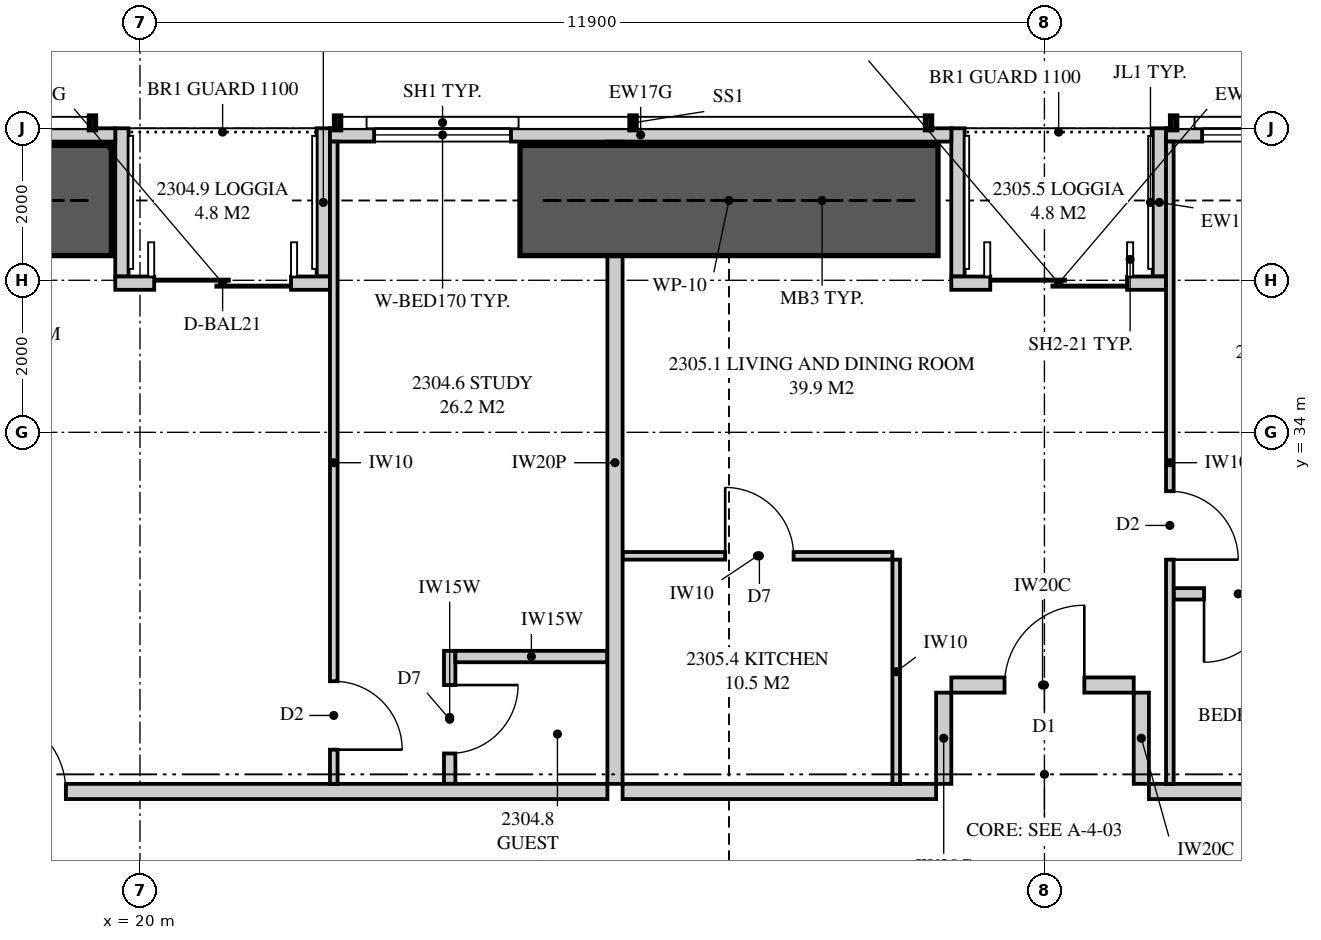
"""IFC4 building model, lengths in metres.
Left out: names, types, materials, properties, quantities, classifications, styles, units other than length and angle.
Written with IfcOpenShell. Run it as: python <this file> out.ifc"""

import sys

from ifc_helpers import new_model, si_unit, direction, frame, frame_2d, origin, place, context, subcontext, project, spatial, polyline, rectangle, outline, extrude, element, fill, save


model = new_model("IFC4")
c1 = context("Model", 3, precision=1e-05, world=origin(), true_north=direction((0.0, 1.0)))
c2 = subcontext(c1, "Body", "Model", "MODEL_VIEW")
j1 = project(units=[si_unit("LENGTHUNIT", "METRE"), si_unit("PLANEANGLEUNIT", "RADIAN")], contexts=[c1])
p1 = place(None, origin())
s1 = spatial("IfcSite", under=j1, at=p1, CompositionType="ELEMENT")
p2 = place(p1, origin())
s2 = spatial("IfcBuilding", under=s1, at=p2, CompositionType="ELEMENT")
p3 = place(p2, frame((0.0, 0.0, 88.1)))
s3 = spatial("IfcBuildingStorey", under=s2, at=p3, CompositionType="ELEMENT", Elevation=88.1)
p4 = place(p3, frame((41.449, 37.913, 0.0), z_axis=(0.0, 0.0, 1.0), x_axis=(-1.0, 0.0, 0.0)))
e1 = element("IfcWall", 1, at=p4, inside=s3, PredefinedType="SOLIDWALL", context=c2, shape_type="SweptSolid", body=[
    extrude(outline(polyline([(0.0, 0.0), (7.949, 0.0), (7.949, 2.15), (2.824, 2.15), (2.824, 3.11), (2.666, 3.11), (2.666, 2.15), (2.62, 2.15), (2.62, 3.11), (0.0, 3.11), (0.0, 0.0)])), frame((0.0, 0.087, 0.0), z_axis=(0.0, -1.0, 0.0), x_axis=(1.0, 0.0, 0.0)), (0.0, 0.0, 1.0), 0.175),
])
p5 = place(p4, frame((5.674, 0.0, 0.4)))
e2 = element("IfcOpeningElement", 2, at=p5, cuts=e1, PredefinedType="OPENING", context=c2, shape_type="SweptSolid", body=[
    extrude(rectangle(XDim=1.8, YDim=1.7, at=frame_2d((0.9, 0.85))), frame((0.0, 0.097, 0.0), z_axis=(0.0, -1.0, 0.0), x_axis=(1.0, 0.0, 0.0)), (0.0, 0.0, 1.0), 0.195),
])
p6 = place(p3, frame((30.675, 37.913, 0.0), z_axis=(0.0, 0.0, 1.0), x_axis=(-1.0, 0.0, 0.0)))
e3 = element("IfcWall", 3, at=p6, inside=s3, PredefinedType="SOLIDWALL", context=c2, shape_type="SweptSolid", body=[
    extrude(rectangle(XDim=8.175, YDim=0.175, at=frame_2d((4.087, 0.0))), origin(), (0.0, 0.0, 1.0), 2.15),
])
p7 = place(p6, frame((5.794, 0.0, 0.4)))
e4 = element("IfcOpeningElement", 4, at=p7, cuts=e3, PredefinedType="OPENING", context=c2, shape_type="SweptSolid", body=[
    extrude(rectangle(XDim=1.8, YDim=1.7, at=frame_2d((0.9, 0.85))), frame((0.0, 0.097, 0.0), z_axis=(0.0, -1.0, 0.0), x_axis=(1.0, 0.0, 0.0)), (0.0, 0.0, 1.0), 0.195),
])
p8 = place(p3, frame((19.675, 37.913, 0.0), z_axis=(0.0, 0.0, 1.0), x_axis=(-1.0, 0.0, 0.0)))
e5 = element("IfcWall", 5, at=p8, inside=s3, PredefinedType="SOLIDWALL", context=c2, shape_type="SweptSolid", body=[
    extrude(outline(polyline([(0.0, 0.0), (10.624, 0.0), (10.624, 3.11), (3.003, 3.11), (3.003, 2.15), (2.958, 2.15), (2.958, 3.11), (2.8, 3.11), (2.8, 2.15), (0.0, 2.15), (0.0, 0.0)])), frame((0.0, 0.087, 0.0), z_axis=(0.0, -1.0, 0.0), x_axis=(1.0, 0.0, 0.0)), (0.0, 0.0, 1.0), 0.175),
])
p9 = place(p8, frame((6.475, 0.0, 0.4)))
e6 = element("IfcOpeningElement", 6, at=p9, cuts=e5, PredefinedType="OPENING", context=c2, shape_type="SweptSolid", body=[
    extrude(rectangle(XDim=1.8, YDim=1.7, at=frame_2d((0.9, 0.85))), frame((0.0, 0.097, 0.0), z_axis=(0.0, -1.0, 0.0), x_axis=(1.0, 0.0, 0.0)), (0.0, 0.0, 1.0), 0.195),
])
p10 = place(p3, frame((33.5, 35.962, 0.0), z_axis=(0.0, 0.0, 1.0), x_axis=(-1.0, 0.0, 0.0)))
e7 = element("IfcWall", 7, at=p10, inside=s3, PredefinedType="SOLIDWALL", context=c2, shape_type="SweptSolid", body=[
    extrude(rectangle(XDim=2.825, YDim=0.175, at=frame_2d((1.413, 0.0))), origin(), (0.0, 0.0, 1.0), 3.11),
])
p11 = place(p10, frame((0.512, 0.0, 0.0)))
e8 = element("IfcOpeningElement", 8, at=p11, cuts=e7, PredefinedType="OPENING", context=c2, shape_type="SweptSolid", body=[
    extrude(rectangle(XDim=1.8, YDim=2.1, at=frame_2d((0.9, 1.05))), frame((0.0, 0.097, 0.0), z_axis=(0.0, -1.0, 0.0), x_axis=(1.0, 0.0, 0.0)), (0.0, 0.0, 1.0), 0.195),
])
for number, where, z_axis, x_axis in (
    (9, (33.413, 38.0, 0.0), (0.0, 0.0, 1.0), (0.0, -1.0, 0.0)),
    (10, (30.762, 38.0, 0.0), (0.0, 0.0, 1.0), (0.0, -1.0, 0.0)),
):
    element("IfcWall", number, at=place(p3, frame(where, z_axis=z_axis, x_axis=x_axis)), inside=s3, PredefinedType="SOLIDWALL", context=c2, shape_type="SweptSolid", body=[
        extrude(outline(polyline([(0.0, 0.0), (1.95, 0.0), (1.95, 3.11), (1.75, 3.11), (1.75, 2.15), (0.15, 2.15), (0.15, 3.11), (0.0, 3.11), (0.0, 0.0)])), frame((0.0, 0.087, 0.0), z_axis=(0.0, -1.0, 0.0), x_axis=(1.0, 0.0, 0.0)), (0.0, 0.0, 1.0), 0.175),
    ])
p12 = place(p3, frame((22.5, 35.962, 0.0), z_axis=(0.0, 0.0, 1.0), x_axis=(-1.0, 0.0, 0.0)))
e11 = element("IfcWall", 11, at=p12, inside=s3, PredefinedType="SOLIDWALL", context=c2, shape_type="SweptSolid", body=[
    extrude(rectangle(XDim=2.825, YDim=0.175, at=frame_2d((1.413, 0.0))), origin(), (0.0, 0.0, 1.0), 3.11),
])
p13 = place(p12, frame((0.512, 0.0, 0.0)))
e12 = element("IfcOpeningElement", 12, at=p13, cuts=e11, PredefinedType="OPENING", context=c2, shape_type="SweptSolid", body=[
    extrude(rectangle(XDim=1.8, YDim=2.1, at=frame_2d((0.9, 1.05))), frame((0.0, 0.097, 0.0), z_axis=(0.0, -1.0, 0.0), x_axis=(1.0, 0.0, 0.0)), (0.0, 0.0, 1.0), 0.195),
])
for number, where, z_axis, x_axis in (
    (13, (22.413, 38.0, 0.0), (0.0, 0.0, 1.0), (0.0, -1.0, 0.0)),
    (14, (19.762, 38.0, 0.0), (0.0, 0.0, 1.0), (0.0, -1.0, 0.0)),
):
    element("IfcWall", number, at=place(p3, frame(where, z_axis=z_axis, x_axis=x_axis)), inside=s3, PredefinedType="SOLIDWALL", context=c2, shape_type="SweptSolid", body=[
        extrude(outline(polyline([(0.0, 0.0), (1.95, 0.0), (1.95, 3.11), (1.75, 3.11), (1.75, 2.15), (0.15, 2.15), (0.15, 3.11), (0.0, 3.11), (0.0, 0.0)])), frame((0.0, 0.087, 0.0), z_axis=(0.0, -1.0, 0.0), x_axis=(1.0, 0.0, 0.0)), (0.0, 0.0, 1.0), 0.175),
    ])
p14 = place(p3, frame((26.25, 37.825, 0.0), z_axis=(0.0, 0.0, 1.0), x_axis=(0.0, -1.0, 0.0)))
e15 = element("IfcWall", 15, at=p14, inside=s3, PredefinedType="PARTITIONING", context=c2, shape_type="SweptSolid", body=[
    extrude(outline(polyline([(0.526, 2.15), (0.0, 2.15), (0.0, 0.0), (0.526, 0.0), (0.526, 0.491), (1.024, 0.491), (1.024, 0.0), (8.45, 0.0), (8.45, 3.11), (1.685, 3.11), (1.685, 2.15), (1.024, 2.15), (1.024, 1.659), (0.526, 1.659), (0.526, 2.15)])), frame((0.0, 0.1, 0.0), z_axis=(0.0, -1.0, 0.0), x_axis=(1.0, 0.0, 0.0)), (0.0, 0.0, 1.0), 0.2),
])
p15 = place(p3, frame((17.775, 29.275, 0.0), z_axis=(0.0, 0.0, 1.0), x_axis=(1.0, 0.0, 0.0)))
e16 = element("IfcWall", 16, at=p15, inside=s3, PredefinedType="PARTITIONING", context=c2, shape_type="SweptSolid", body=[
    extrude(rectangle(XDim=8.375, YDim=0.2, at=frame_2d((4.188, 0.0))), origin(), (0.0, 0.0, 1.0), 3.11),
])
p16 = place(p15, frame((0.2, 0.0, 0.0)))
e17 = element("IfcOpeningElement", 17, at=p16, cuts=e16, PredefinedType="OPENING", context=c2, shape_type="SweptSolid", body=[
    extrude(rectangle(XDim=1.05, YDim=2.2, at=frame_2d((0.525, 1.1))), frame((0.0, 0.11, 0.0), z_axis=(0.0, -1.0, 0.0), x_axis=(1.0, 0.0, 0.0)), (0.0, 0.0, 1.0), 0.22),
])
p17 = place(p3, frame((22.55, 37.825, 0.0), z_axis=(0.0, 0.0, 1.0), x_axis=(0.0, -1.0, 0.0)))
e18 = element("IfcWall", 18, at=p17, inside=s3, PredefinedType="PARTITIONING", context=c2, shape_type="SweptSolid", body=[
    extrude(outline(polyline([(0.0, 0.0), (8.45, 0.0), (8.45, 3.11), (1.635, 3.11), (1.635, 2.15), (0.0, 2.15), (0.0, 3.11), (0.0, 0.0)])), frame((0.0, 0.05, 0.0), z_axis=(0.0, -1.0, 0.0), x_axis=(1.0, 0.0, 0.0)), (0.0, 0.0, 1.0), 0.1),
])
p18 = place(p17, frame((7.1, 0.0, 0.0)))
e19 = element("IfcOpeningElement", 19, at=p18, cuts=e18, PredefinedType="OPENING", context=c2, shape_type="SweptSolid", body=[
    extrude(rectangle(XDim=0.9, YDim=2.1, at=frame_2d((0.45, 1.05))), frame((0.0, 0.06, 0.0), z_axis=(0.0, -1.0, 0.0), x_axis=(1.0, 0.0, 0.0)), (0.0, 0.0, 1.0), 0.12),
])
p19 = place(p3, frame((26.35, 29.275, 0.0), z_axis=(0.0, 0.0, 1.0), x_axis=(1.0, 0.0, 0.0)))
e20 = element("IfcWall", 20, at=p19, inside=s3, PredefinedType="PARTITIONING", context=c2, shape_type="SweptSolid", body=[
    extrude(outline(polyline([(0.0, 0.0), (4.125, 0.0), (4.125, 3.11), (1.746, 3.11), (1.746, 2.531), (1.054, 2.531), (1.054, 3.11), (0.0, 3.11), (0.0, 0.0)])), frame((0.0, 0.1, 0.0), z_axis=(0.0, -1.0, 0.0), x_axis=(1.0, 0.0, 0.0)), (0.0, 0.0, 1.0), 0.2),
])
p20 = place(p3, frame((33.55, 37.825, 0.0), z_axis=(0.0, 0.0, 1.0), x_axis=(0.0, -1.0, 0.0)))
e21 = element("IfcWall", 21, at=p20, inside=s3, PredefinedType="PARTITIONING", context=c2, shape_type="SweptSolid", body=[
    extrude(outline(polyline([(0.0, 0.0), (8.45, 0.0), (8.45, 3.11), (1.635, 3.11), (1.635, 2.15), (0.0, 2.15), (0.0, 3.11), (0.0, 0.0)])), frame((0.0, 0.05, 0.0), z_axis=(0.0, -1.0, 0.0), x_axis=(1.0, 0.0, 0.0)), (0.0, 0.0, 1.0), 0.1),
])
p21 = place(p20, frame((4.6, 0.0, 0.0)))
e22 = element("IfcOpeningElement", 22, at=p21, cuts=e21, PredefinedType="OPENING", context=c2, shape_type="SweptSolid", body=[
    extrude(rectangle(XDim=0.9, YDim=2.1, at=frame_2d((0.45, 1.05))), frame((0.0, 0.06, 0.0), z_axis=(0.0, -1.0, 0.0), x_axis=(1.0, 0.0, 0.0)), (0.0, 0.0, 1.0), 0.12),
])
p22 = place(p3, frame((33.6, 31.875, 0.0), z_axis=(0.0, 0.0, 1.0), x_axis=(1.0, 0.0, 0.0)))
e23 = element("IfcWall", 23, at=p22, inside=s3, PredefinedType="PLUMBINGWALL", context=c2, shape_type="SweptSolid", body=[
    extrude(rectangle(XDim=3.8, YDim=0.15, at=frame_2d((1.9, 0.0))), origin(), (0.0, 0.0, 1.0), 3.11),
])
p23 = place(p22, frame((0.4, 0.0, 0.0)))
e24 = element("IfcOpeningElement", 24, at=p23, cuts=e23, PredefinedType="OPENING", context=c2, shape_type="SweptSolid", body=[
    extrude(rectangle(XDim=0.9, YDim=2.1, at=frame_2d((0.45, 1.05))), frame((0.0, 0.085, 0.0), z_axis=(0.0, -1.0, 0.0), x_axis=(1.0, 0.0, 0.0)), (0.0, 0.0, 1.0), 0.17),
])
p24 = place(p3, frame((26.35, 32.375, 0.0), z_axis=(0.0, 0.0, 1.0), x_axis=(1.0, 0.0, 0.0)))
e25 = element("IfcWall", 25, at=p24, inside=s3, PredefinedType="PARTITIONING", context=c2, shape_type="SweptSolid", body=[
    extrude(outline(polyline([(0.0, 0.0), (3.55, 0.0), (3.55, 3.11), (1.696, 3.11), (1.696, 2.531), (1.104, 2.531), (1.104, 3.11), (0.0, 3.11), (0.0, 0.0)])), frame((0.0, 0.05, 0.0), z_axis=(0.0, -1.0, 0.0), x_axis=(1.0, 0.0, 0.0)), (0.0, 0.0, 1.0), 0.1),
])
p25 = place(p24, frame((1.35, 0.0, 0.0)))
e26 = element("IfcOpeningElement", 26, at=p25, cuts=e25, PredefinedType="OPENING", context=c2, shape_type="SweptSolid", body=[
    extrude(rectangle(XDim=0.9, YDim=2.1, at=frame_2d((0.45, 1.05))), frame((0.0, 0.06, 0.0), z_axis=(0.0, -1.0, 0.0), x_axis=(1.0, 0.0, 0.0)), (0.0, 0.0, 1.0), 0.12),
])
p26 = place(p3, frame((29.95, 32.325, 0.0), z_axis=(0.0, 0.0, 1.0), x_axis=(0.0, -1.0, 0.0)))
e27 = element("IfcWall", 27, at=p26, inside=s3, PredefinedType="PARTITIONING", context=c2, shape_type="SweptSolid", body=[
    extrude(rectangle(XDim=2.95, YDim=0.1, at=frame_2d((1.475, 0.0))), origin(), (0.0, 0.0, 1.0), 3.11),
])
p27 = place(p3, frame((33.275, 29.275, 0.0), z_axis=(0.0, 0.0, 1.0), x_axis=(1.0, 0.0, 0.0)))
e28 = element("IfcWall", 28, at=p27, inside=s3, PredefinedType="PARTITIONING", context=c2, shape_type="SweptSolid", body=[
    extrude(rectangle(XDim=4.125, YDim=0.2, at=frame_2d((2.062, 0.0))), origin(), (0.0, 0.0, 1.0), 3.11),
])
p28 = place(p3, frame((30.675, 30.675, 0.0), z_axis=(0.0, 0.0, 1.0), x_axis=(1.0, 0.0, 0.0)))
e29 = element("IfcWall", 29, at=p28, inside=s3, PredefinedType="PARTITIONING", context=c2, shape_type="SweptSolid", body=[
    extrude(rectangle(XDim=2.4, YDim=0.2, at=frame_2d((1.2, 0.0))), origin(), (0.0, 0.0, 1.0), 3.11),
])
p29 = place(p28, frame((0.7, 0.0, 0.0)))
e30 = element("IfcOpeningElement", 30, at=p29, cuts=e29, PredefinedType="OPENING", context=c2, shape_type="SweptSolid", body=[
    extrude(rectangle(XDim=1.05, YDim=2.2, at=frame_2d((0.525, 1.1))), frame((0.0, 0.11, 0.0), z_axis=(0.0, -1.0, 0.0), x_axis=(1.0, 0.0, 0.0)), (0.0, 0.0, 1.0), 0.22),
])
for number, where, z_axis, x_axis in (
    (31, (30.575, 29.375, 0.0), (0.0, 0.0, 1.0), (0.0, 1.0, 0.0)),
    (32, (33.175, 29.375, 0.0), (0.0, 0.0, 1.0), (0.0, 1.0, 0.0)),
):
    element("IfcWall", number, at=place(p3, frame(where, z_axis=z_axis, x_axis=x_axis)), inside=s3, PredefinedType="PARTITIONING", context=c2, shape_type="SweptSolid", body=[
        extrude(rectangle(XDim=1.2, YDim=0.2, at=frame_2d((0.6, 0.0))), origin(), (0.0, 0.0, 1.0), 3.11),
    ])
p30 = place(p3, frame((24.075, 29.375, 0.0), z_axis=(0.0, 0.0, 1.0), x_axis=(0.0, 1.0, 0.0)))
e33 = element("IfcWall", 33, at=p30, inside=s3, PredefinedType="PLUMBINGWALL", context=c2, shape_type="SweptSolid", body=[
    extrude(rectangle(XDim=1.75, YDim=0.15, at=frame_2d((0.875, 0.0))), origin(), (0.0, 0.0, 1.0), 3.11),
])
p31 = place(p30, frame((0.4, 0.0, 0.0)))
e34 = element("IfcOpeningElement", 34, at=p31, cuts=e33, PredefinedType="OPENING", context=c2, shape_type="SweptSolid", body=[
    extrude(rectangle(XDim=0.9, YDim=2.1, at=frame_2d((0.45, 1.05))), frame((0.0, 0.085, 0.0), z_axis=(0.0, -1.0, 0.0), x_axis=(1.0, 0.0, 0.0)), (0.0, 0.0, 1.0), 0.17),
])
p32 = place(p3, frame((26.15, 31.05, 0.0), z_axis=(0.0, 0.0, 1.0), x_axis=(-1.0, 0.0, 0.0)))
e35 = element("IfcWall", 35, at=p32, inside=s3, PredefinedType="PLUMBINGWALL", context=c2, shape_type="SweptSolid", body=[
    extrude(rectangle(XDim=2.0, YDim=0.15, at=frame_2d((1.0, 0.0))), origin(), (0.0, 0.0, 1.0), 3.11),
])
for number, where, z_axis, x_axis in (
    (36, (25.0, 37.05, 0.0), (0.0, 0.0, 1.0), (1.0, 0.0, 0.0)),
    (37, (14.125, 37.05, 0.0), (0.0, 0.0, 1.0), (1.0, 0.0, 0.0)),
):
    element("IfcWall", number, at=place(p3, frame(where, z_axis=z_axis, x_axis=x_axis)), inside=s3, PredefinedType="SHEAR", context=c2, shape_type="SweptSolid", body=[
        extrude(rectangle(XDim=5.5, YDim=1.45, at=frame_2d((2.75, 0.0))), origin(), (0.0, 0.0, 1.0), 3.35),
    ])
p33 = place(p5, origin())
e38 = element("IfcWindow", 38, at=p33, inside=s3, PartitioningType="SINGLE_PANEL", PredefinedType="WINDOW", context=c2, shape_type="SweptSolid", body=[
    extrude(rectangle(XDim=1.8, YDim=1.7, at=frame_2d((0.9, 0.85))), frame((0.0, 0.03, 0.0), z_axis=(0.0, -1.0, 0.0), x_axis=(1.0, 0.0, 0.0)), (0.0, 0.0, 1.0), 0.06),
])
fill(e2, e38)
p34 = place(p11, origin())
e39 = element("IfcDoor", 39, at=p34, inside=s3, OperationType="SLIDING_TO_LEFT", PredefinedType="DOOR", context=c2, shape_type="SweptSolid", body=[
    extrude(rectangle(XDim=1.8, YDim=2.1, at=frame_2d((0.9, 1.05))), frame((0.0, 0.025, 0.0), z_axis=(0.0, -1.0, 0.0), x_axis=(1.0, 0.0, 0.0)), (0.0, 0.0, 1.0), 0.05),
])
fill(e8, e39)
p35 = place(p7, origin())
e40 = element("IfcWindow", 40, at=p35, inside=s3, PartitioningType="SINGLE_PANEL", PredefinedType="WINDOW", context=c2, shape_type="SweptSolid", body=[
    extrude(rectangle(XDim=1.8, YDim=1.7, at=frame_2d((0.9, 0.85))), frame((0.0, 0.03, 0.0), z_axis=(0.0, -1.0, 0.0), x_axis=(1.0, 0.0, 0.0)), (0.0, 0.0, 1.0), 0.06),
])
fill(e4, e40)
p36 = place(p13, origin())
e41 = element("IfcDoor", 41, at=p36, inside=s3, OperationType="SLIDING_TO_LEFT", PredefinedType="DOOR", context=c2, shape_type="SweptSolid", body=[
    extrude(rectangle(XDim=1.8, YDim=2.1, at=frame_2d((0.9, 1.05))), frame((0.0, 0.025, 0.0), z_axis=(0.0, -1.0, 0.0), x_axis=(1.0, 0.0, 0.0)), (0.0, 0.0, 1.0), 0.05),
])
fill(e12, e41)
p37 = place(p16, origin())
e42 = element("IfcDoor", 42, at=p37, inside=s3, OperationType="SINGLE_SWING_LEFT", PredefinedType="DOOR", context=c2, shape_type="SweptSolid", body=[
    extrude(rectangle(XDim=1.05, YDim=2.2, at=frame_2d((0.525, 1.1))), frame((0.0, 0.025, 0.0), z_axis=(0.0, -1.0, 0.0), x_axis=(1.0, 0.0, 0.0)), (0.0, 0.0, 1.0), 0.05),
])
fill(e17, e42)
p38 = place(p18, origin())
e43 = element("IfcDoor", 43, at=p38, inside=s3, OperationType="SINGLE_SWING_RIGHT", PredefinedType="DOOR", context=c2, shape_type="SweptSolid", body=[
    extrude(rectangle(XDim=0.9, YDim=2.1, at=frame_2d((0.45, 1.05))), frame((0.0, 0.025, 0.0), z_axis=(0.0, -1.0, 0.0), x_axis=(1.0, 0.0, 0.0)), (0.0, 0.0, 1.0), 0.05),
])
fill(e19, e43)
p39 = place(p29, origin())
e44 = element("IfcDoor", 44, at=p39, inside=s3, OperationType="SINGLE_SWING_RIGHT", PredefinedType="DOOR", context=c2, shape_type="SweptSolid", body=[
    extrude(rectangle(XDim=1.05, YDim=2.2, at=frame_2d((0.525, 1.1))), frame((0.0, 0.025, 0.0), z_axis=(0.0, -1.0, 0.0), x_axis=(1.0, 0.0, 0.0)), (0.0, 0.0, 1.0), 0.05),
])
fill(e30, e44)
p40 = place(p21, origin())
e45 = element("IfcDoor", 45, at=p40, inside=s3, OperationType="SINGLE_SWING_RIGHT", PredefinedType="DOOR", context=c2, shape_type="SweptSolid", body=[
    extrude(rectangle(XDim=0.9, YDim=2.1, at=frame_2d((0.45, 1.05))), frame((0.0, 0.025, 0.0), z_axis=(0.0, -1.0, 0.0), x_axis=(1.0, 0.0, 0.0)), (0.0, 0.0, 1.0), 0.05),
])
fill(e22, e45)
p41 = place(p23, frame((0.9, 0.0, 0.0), z_axis=(0.0, 0.0, 1.0), x_axis=(-1.0, 0.0, 0.0)))
e46 = element("IfcDoor", 46, at=p41, inside=s3, OperationType="SINGLE_SWING_RIGHT", PredefinedType="DOOR", context=c2, shape_type="SweptSolid", body=[
    extrude(rectangle(XDim=0.9, YDim=2.1, at=frame_2d((0.45, 1.05))), frame((0.0, 0.025, 0.0), z_axis=(0.0, -1.0, 0.0), x_axis=(1.0, 0.0, 0.0)), (0.0, 0.0, 1.0), 0.05),
])
fill(e24, e46)
p42 = place(p25, origin())
e47 = element("IfcDoor", 47, at=p42, inside=s3, OperationType="SINGLE_SWING_LEFT", PredefinedType="DOOR", context=c2, shape_type="SweptSolid", body=[
    extrude(rectangle(XDim=0.9, YDim=2.1, at=frame_2d((0.45, 1.05))), frame((0.0, 0.025, 0.0), z_axis=(0.0, -1.0, 0.0), x_axis=(1.0, 0.0, 0.0)), (0.0, 0.0, 1.0), 0.05),
])
fill(e26, e47)
p43 = place(p31, frame((0.9, 0.0, 0.0), z_axis=(0.0, 0.0, 1.0), x_axis=(-1.0, 0.0, 0.0)))
e48 = element("IfcDoor", 48, at=p43, inside=s3, OperationType="SINGLE_SWING_LEFT", PredefinedType="DOOR", context=c2, shape_type="SweptSolid", body=[
    extrude(rectangle(XDim=0.9, YDim=2.1, at=frame_2d((0.45, 1.05))), frame((0.0, 0.025, 0.0), z_axis=(0.0, -1.0, 0.0), x_axis=(1.0, 0.0, 0.0)), (0.0, 0.0, 1.0), 0.05),
])
fill(e34, e48)
save(model, sys.argv[1])
